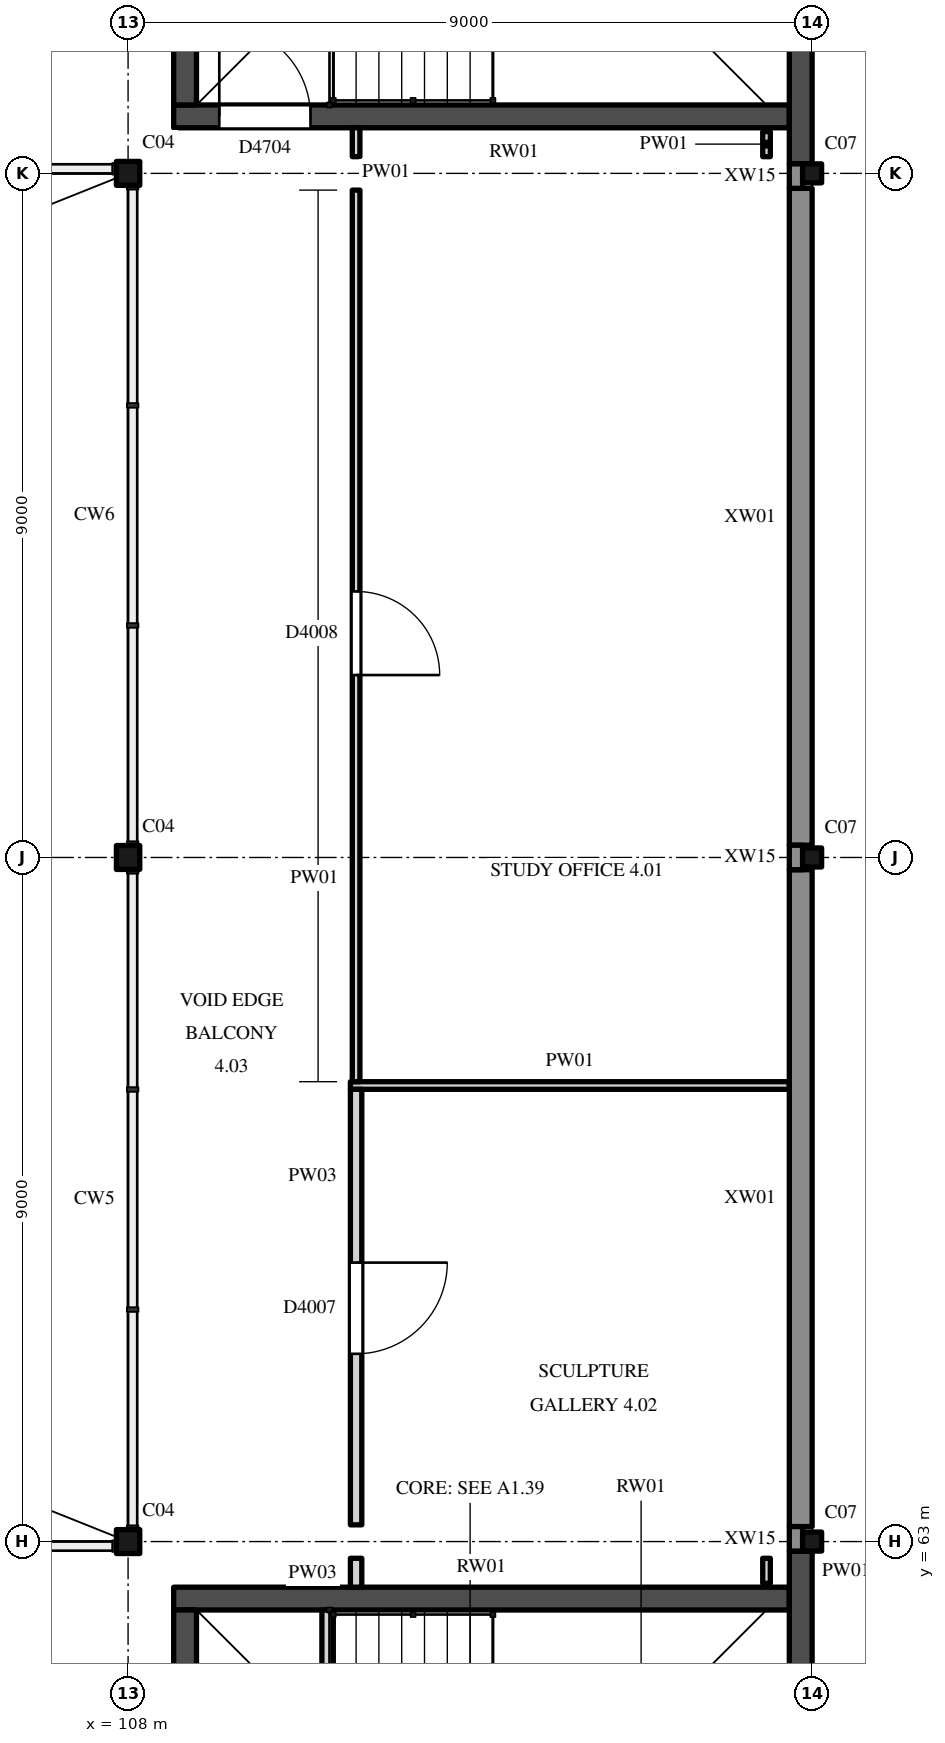
"""IFC4 building model, lengths in metres.
Left out: names, types, materials, properties, quantities, classifications, styles, units other than length and angle.
Written with IfcOpenShell. Run it as: python <this file> out.ifc"""

import sys

from ifc_helpers import new_model, si_unit, direction, frame, frame_2d, origin, origin_2d, place, context, subcontext, project, spatial, rectangle, hollow_rectangle, i_section, extrude, element, fill, save


model = new_model("IFC4")
c1 = context("Model", 3, precision=1e-05, world=origin(), true_north=direction((0.0, 1.0)))
c2 = subcontext(c1, "Body", "Model", "MODEL_VIEW")
j1 = project(units=[si_unit("LENGTHUNIT", "METRE"), si_unit("PLANEANGLEUNIT", "RADIAN")], contexts=[c1])
p1 = place(None, origin())
s1 = spatial("IfcSite", under=j1, at=p1, CompositionType="ELEMENT")
p2 = place(p1, origin())
s2 = spatial("IfcBuilding", under=s1, at=p2, CompositionType="ELEMENT")
p3 = place(p2, frame((0.0, 0.0, 26.0)))
s3 = spatial("IfcBuildingStorey", under=s2, at=p3, CompositionType="ELEMENT", Elevation=26.0)
p4 = place(p3, frame((108.0, 63.0, 0.0), z_axis=(0.0, 0.0, 1.0), x_axis=(1.0, 0.0, 0.0)))
e1 = element("IfcColumn", 1, at=p4, inside=s3, PredefinedType="COLUMN", context=c2, shape_type="SweptSolid", body=[
    extrude(i_section(OverallWidth=0.307, OverallDepth=0.315, WebThickness=0.012, FlangeThickness=0.019, FilletRadius=0.017, at=origin_2d()), origin(), (0.0, 0.0, 1.0), 5.0),
])
p5 = place(p3, frame((117.0, 63.0, 0.0), z_axis=(0.0, 0.0, 1.0), x_axis=(1.0, 0.0, 0.0)))
e2 = element("IfcColumn", 2, at=p5, inside=s3, PredefinedType="COLUMN", context=c2, shape_type="SweptSolid", body=[
    extrude(hollow_rectangle(XDim=0.25, YDim=0.25, WallThickness=0.009, InnerFilletRadius=0.013, OuterFilletRadius=0.022, at=origin_2d()), origin(), (0.0, 0.0, 1.0), 5.0),
])
p6 = place(p3, frame((108.0, 72.0, 0.0), z_axis=(0.0, 0.0, 1.0), x_axis=(1.0, 0.0, 0.0)))
e3 = element("IfcColumn", 3, at=p6, inside=s3, PredefinedType="COLUMN", context=c2, shape_type="SweptSolid", body=[
    extrude(i_section(OverallWidth=0.307, OverallDepth=0.315, WebThickness=0.012, FlangeThickness=0.019, FilletRadius=0.017, at=origin_2d()), origin(), (0.0, 0.0, 1.0), 5.0),
])
p7 = place(p3, frame((117.0, 72.0, 0.0), z_axis=(0.0, 0.0, 1.0), x_axis=(1.0, 0.0, 0.0)))
e4 = element("IfcColumn", 4, at=p7, inside=s3, PredefinedType="COLUMN", context=c2, shape_type="SweptSolid", body=[
    extrude(hollow_rectangle(XDim=0.25, YDim=0.25, WallThickness=0.009, InnerFilletRadius=0.013, OuterFilletRadius=0.022, at=origin_2d()), origin(), (0.0, 0.0, 1.0), 5.0),
])
p8 = place(p3, frame((108.0, 81.0, 0.0), z_axis=(0.0, 0.0, 1.0), x_axis=(1.0, 0.0, 0.0)))
e5 = element("IfcColumn", 5, at=p8, inside=s3, PredefinedType="COLUMN", context=c2, shape_type="SweptSolid", body=[
    extrude(i_section(OverallWidth=0.307, OverallDepth=0.315, WebThickness=0.012, FlangeThickness=0.019, FilletRadius=0.017, at=origin_2d()), origin(), (0.0, 0.0, 1.0), 5.0),
])
p9 = place(p3, frame((117.0, 81.0, 0.0), z_axis=(0.0, 0.0, 1.0), x_axis=(1.0, 0.0, 0.0)))
e6 = element("IfcColumn", 6, at=p9, inside=s3, PredefinedType="COLUMN", context=c2, shape_type="SweptSolid", body=[
    extrude(hollow_rectangle(XDim=0.25, YDim=0.25, WallThickness=0.009, InnerFilletRadius=0.013, OuterFilletRadius=0.022, at=origin_2d()), origin(), (0.0, 0.0, 1.0), 5.0),
])
p10 = place(p3, frame((108.6, 62.25, 0.0), z_axis=(0.0, 0.0, 1.0), x_axis=(1.0, 0.0, 0.0)))
e7 = element("IfcWall", 7, at=p10, inside=s3, PredefinedType="SHEAR", context=c2, shape_type="SweptSolid", body=[
    extrude(rectangle(XDim=8.1, YDim=0.3, at=frame_2d((4.05, 0.0))), origin(), (0.0, 0.0, 1.0), 5.0),
])
p11 = place(p3, frame((108.75, 54.3, 0.0), z_axis=(0.0, 0.0, 1.0), x_axis=(0.0, 1.0, 0.0)))
e8 = element("IfcWall", 8, at=p11, inside=s3, PredefinedType="SHEAR", context=c2, shape_type="SweptSolid", body=[
    extrude(rectangle(XDim=7.8, YDim=0.3, at=frame_2d((3.9, 0.0))), origin(), (0.0, 0.0, 1.0), 5.0),
])
p12 = place(p11, frame((3.6, 0.0, 0.0)))
e9 = element("IfcOpeningElement", 9, at=p12, cuts=e8, PredefinedType="OPENING", context=c2, shape_type="SweptSolid", body=[
    extrude(rectangle(XDim=1.2, YDim=2.1, at=frame_2d((0.6, 1.05))), frame((0.0, 0.16, 0.0), z_axis=(0.0, -1.0, 0.0), x_axis=(1.0, 0.0, 0.0)), (0.0, 0.0, 1.0), 0.32),
])
p13 = place(p3, frame((116.85, 54.125, 0.0), z_axis=(0.0, 0.0, 1.0), x_axis=(0.0, 1.0, 0.0)))
e10 = element("IfcWall", 10, at=p13, inside=s3, PredefinedType="SHEAR", context=c2, shape_type="SweptSolid", body=[
    extrude(rectangle(XDim=8.75, YDim=0.3, at=frame_2d((4.375, 0.0))), origin(), (0.0, 0.0, 1.0), 5.0),
])
p14 = place(p3, frame((108.6, 81.75, 0.0), z_axis=(0.0, 0.0, 1.0), x_axis=(1.0, 0.0, 0.0)))
e11 = element("IfcWall", 11, at=p14, inside=s3, PredefinedType="SHEAR", context=c2, shape_type="SweptSolid", body=[
    extrude(rectangle(XDim=8.1, YDim=0.3, at=frame_2d((4.05, 0.0))), origin(), (0.0, 0.0, 1.0), 5.0),
])
p15 = place(p14, frame((0.6, 0.0, 0.0)))
e12 = element("IfcOpeningElement", 12, at=p15, cuts=e11, PredefinedType="OPENING", context=c2, shape_type="SweptSolid", body=[
    extrude(rectangle(XDim=1.2, YDim=2.1, at=frame_2d((0.6, 1.05))), frame((0.0, 0.16, 0.0), z_axis=(0.0, -1.0, 0.0), x_axis=(1.0, 0.0, 0.0)), (0.0, 0.0, 1.0), 0.32),
])
p16 = place(p3, frame((108.75, 81.9, 0.0), z_axis=(0.0, 0.0, 1.0), x_axis=(0.0, 1.0, 0.0)))
e13 = element("IfcWall", 13, at=p16, inside=s3, PredefinedType="SHEAR", context=c2, shape_type="SweptSolid", body=[
    extrude(rectangle(XDim=7.8, YDim=0.3, at=frame_2d((3.9, 0.0))), origin(), (0.0, 0.0, 1.0), 5.0),
])
p17 = place(p16, frame((3.0, 0.0, 0.0)))
e14 = element("IfcOpeningElement", 14, at=p17, cuts=e13, PredefinedType="OPENING", context=c2, shape_type="SweptSolid", body=[
    extrude(rectangle(XDim=1.2, YDim=2.1, at=frame_2d((0.6, 1.05))), frame((0.0, 0.16, 0.0), z_axis=(0.0, -1.0, 0.0), x_axis=(1.0, 0.0, 0.0)), (0.0, 0.0, 1.0), 0.32),
])
p18 = place(p3, frame((116.85, 81.125, 0.0), z_axis=(0.0, 0.0, 1.0), x_axis=(0.0, 1.0, 0.0)))
e15 = element("IfcWall", 15, at=p18, inside=s3, PredefinedType="SHEAR", context=c2, shape_type="SweptSolid", body=[
    extrude(rectangle(XDim=8.711, YDim=0.3, at=frame_2d((4.356, 0.0))), origin(), (0.0, 0.0, 1.0), 5.0),
])
p19 = place(p3, frame((110.625, 58.5, 0.0), z_axis=(0.0, 0.0, 1.0), x_axis=(0.0, 1.0, 0.0)))
e16 = element("IfcWall", 16, at=p19, inside=s3, PredefinedType="STANDARD", context=c2, shape_type="SweptSolid", body=[
    extrude(rectangle(XDim=3.6, YDim=0.15, at=frame_2d((1.8, 0.0))), origin(), (0.0, 0.0, 1.0), 2.3),
])
for number, where, z_axis, x_axis in (
    (17, (116.85, 63.197, 0.0), (0.0, 0.0, 1.0), (0.0, 1.0, 0.0)),
    (18, (116.85, 72.161, 0.0), (0.0, 0.0, 1.0), (0.0, 1.0, 0.0)),
):
    element("IfcWall", number, at=place(p3, frame(where, z_axis=z_axis, x_axis=x_axis)), inside=s3, PredefinedType="SOLIDWALL", context=c2, shape_type="SweptSolid", body=[
        extrude(rectangle(XDim=8.642, YDim=0.3, at=frame_2d((4.321, 0.0))), origin(), (0.0, 0.0, 1.0), 4.419),
    ])
p20 = place(p3, frame((116.788, 62.875, 0.0), z_axis=(0.0, 0.0, 1.0), x_axis=(0.0, 1.0, 0.0)))
e19 = element("IfcWall", 19, at=p20, inside=s3, PredefinedType="SOLIDWALL", context=c2, shape_type="SweptSolid", body=[
    extrude(rectangle(XDim=0.322, YDim=0.175, at=frame_2d((0.161, 0.0))), origin(), (0.0, 0.0, 1.0), 5.0),
])
p21 = place(p3, frame((116.788, 71.839, 0.0), z_axis=(0.0, 0.0, 1.0), x_axis=(0.0, 1.0, 0.0)))
e20 = element("IfcWall", 20, at=p21, inside=s3, PredefinedType="SOLIDWALL", context=c2, shape_type="SweptSolid", body=[
    extrude(rectangle(XDim=0.322, YDim=0.175, at=frame_2d((0.161, 0.0))), origin(), (0.0, 0.0, 1.0), 4.419),
])
p22 = place(p3, frame((116.788, 80.803, 0.0), z_axis=(0.0, 0.0, 1.0), x_axis=(0.0, 1.0, 0.0)))
e21 = element("IfcWall", 21, at=p22, inside=s3, PredefinedType="SOLIDWALL", context=c2, shape_type="SweptSolid", body=[
    extrude(rectangle(XDim=0.322, YDim=0.175, at=frame_2d((0.161, 0.0))), origin(), (0.0, 0.0, 1.0), 5.0),
])
p23 = place(p3, frame((110.925, 69.0, 0.0), z_axis=(0.0, 0.0, 1.0), x_axis=(1.0, 0.0, 0.0)))
e22 = element("IfcWall", 22, at=p23, inside=s3, PredefinedType="PARTITIONING", context=c2, shape_type="SweptSolid", body=[
    extrude(rectangle(XDim=5.775, YDim=0.1, at=frame_2d((2.887, 0.0))), origin(), (0.0, 0.0, 1.0), 4.521),
])
p24 = place(p3, frame((111.0, 62.4, 0.0), z_axis=(0.0, 0.0, 1.0), x_axis=(0.0, 1.0, 0.0)))
e23 = element("IfcWall", 23, at=p24, inside=s3, PredefinedType="PARTITIONING", context=c2, shape_type="SweptSolid", body=[
    extrude(rectangle(XDim=0.38, YDim=0.15, at=frame_2d((0.19, 0.0))), origin(), (0.0, 0.0, 1.0), 4.825),
])
p25 = place(p3, frame((111.0, 63.22, 0.0), z_axis=(0.0, 0.0, 1.0), x_axis=(0.0, 1.0, 0.0)))
e24 = element("IfcWall", 24, at=p25, inside=s3, PredefinedType="PARTITIONING", context=c2, shape_type="SweptSolid", body=[
    extrude(rectangle(XDim=5.73, YDim=0.15, at=frame_2d((2.865, 0.0))), origin(), (0.0, 0.0, 1.0), 4.825),
])
p26 = place(p25, frame((2.25, 0.0, 0.0)))
e25 = element("IfcOpeningElement", 25, at=p26, cuts=e24, PredefinedType="OPENING", context=c2, shape_type="SweptSolid", body=[
    extrude(rectangle(XDim=1.2, YDim=2.4, at=frame_2d((0.6, 1.2))), frame((0.0, 0.085, 0.0), z_axis=(0.0, -1.0, 0.0), x_axis=(1.0, 0.0, 0.0)), (0.0, 0.0, 1.0), 0.17),
])
p27 = place(p3, frame((111.0, 69.05, 0.0), z_axis=(0.0, 0.0, 1.0), x_axis=(0.0, 1.0, 0.0)))
e26 = element("IfcWall", 26, at=p27, inside=s3, PredefinedType="PARTITIONING", context=c2, shape_type="SweptSolid", body=[
    extrude(rectangle(XDim=11.73, YDim=0.1, at=frame_2d((5.865, 0.0))), origin(), (0.0, 0.0, 1.0), 4.825),
])
p28 = place(p27, frame((5.35, 0.0, 0.0)))
e27 = element("IfcOpeningElement", 27, at=p28, cuts=e26, PredefinedType="OPENING", context=c2, shape_type="SweptSolid", body=[
    extrude(rectangle(XDim=1.1, YDim=2.4, at=frame_2d((0.55, 1.2))), frame((0.0, 0.06, 0.0), z_axis=(0.0, -1.0, 0.0), x_axis=(1.0, 0.0, 0.0)), (0.0, 0.0, 1.0), 0.12),
])
p29 = place(p3, frame((111.0, 81.22, 0.0), z_axis=(0.0, 0.0, 1.0), x_axis=(0.0, 1.0, 0.0)))
e28 = element("IfcWall", 28, at=p29, inside=s3, PredefinedType="PARTITIONING", context=c2, shape_type="SweptSolid", body=[
    extrude(rectangle(XDim=0.38, YDim=0.1, at=frame_2d((0.19, 0.0))), origin(), (0.0, 0.0, 1.0), 4.825),
])
for number, where, z_axis, x_axis in (
    (29, (116.4, 62.45, 0.0), (0.0, 0.0, 1.0), (0.0, 1.0, 0.0)),
    (30, (116.4, 81.22, 0.0), (0.0, 0.0, 1.0), (0.0, 1.0, 0.0)),
):
    element("IfcWall", number, at=place(p3, frame(where, z_axis=z_axis, x_axis=x_axis)), inside=s3, PredefinedType="PARTITIONING", context=c2, shape_type="SweptSolid", body=[
        extrude(rectangle(XDim=0.33, YDim=0.1, at=frame_2d((0.165, 0.0))), origin(), (0.0, 0.0, 1.0), 4.825),
    ])
p30 = place(p15, origin())
e31 = element("IfcDoor", 31, at=p30, inside=s3, OperationType="SINGLE_SWING_RIGHT", PredefinedType="DOOR", context=c2, shape_type="SweptSolid", body=[
    extrude(rectangle(XDim=1.2, YDim=2.1, at=frame_2d((0.6, 1.05))), frame((0.0, 0.025, 0.0), z_axis=(0.0, -1.0, 0.0), x_axis=(1.0, 0.0, 0.0)), (0.0, 0.0, 1.0), 0.05),
])
fill(e12, e31)
p31 = place(p26, origin())
e32 = element("IfcDoor", 32, at=p31, inside=s3, OperationType="SINGLE_SWING_RIGHT", PredefinedType="DOOR", context=c2, shape_type="SweptSolid", body=[
    extrude(rectangle(XDim=1.2, YDim=2.4, at=frame_2d((0.6, 1.2))), frame((0.0, 0.025, 0.0), z_axis=(0.0, -1.0, 0.0), x_axis=(1.0, 0.0, 0.0)), (0.0, 0.0, 1.0), 0.05),
])
fill(e25, e32)
p32 = place(p28, origin())
e33 = element("IfcDoor", 33, at=p32, inside=s3, OperationType="SINGLE_SWING_LEFT", PredefinedType="DOOR", context=c2, shape_type="SweptSolid", body=[
    extrude(rectangle(XDim=1.1, YDim=2.4, at=frame_2d((0.55, 1.2))), frame((0.0, 0.025, 0.0), z_axis=(0.0, -1.0, 0.0), x_axis=(1.0, 0.0, 0.0)), (0.0, 0.0, 1.0), 0.05),
])
fill(e27, e33)
save(model, sys.argv[1])
